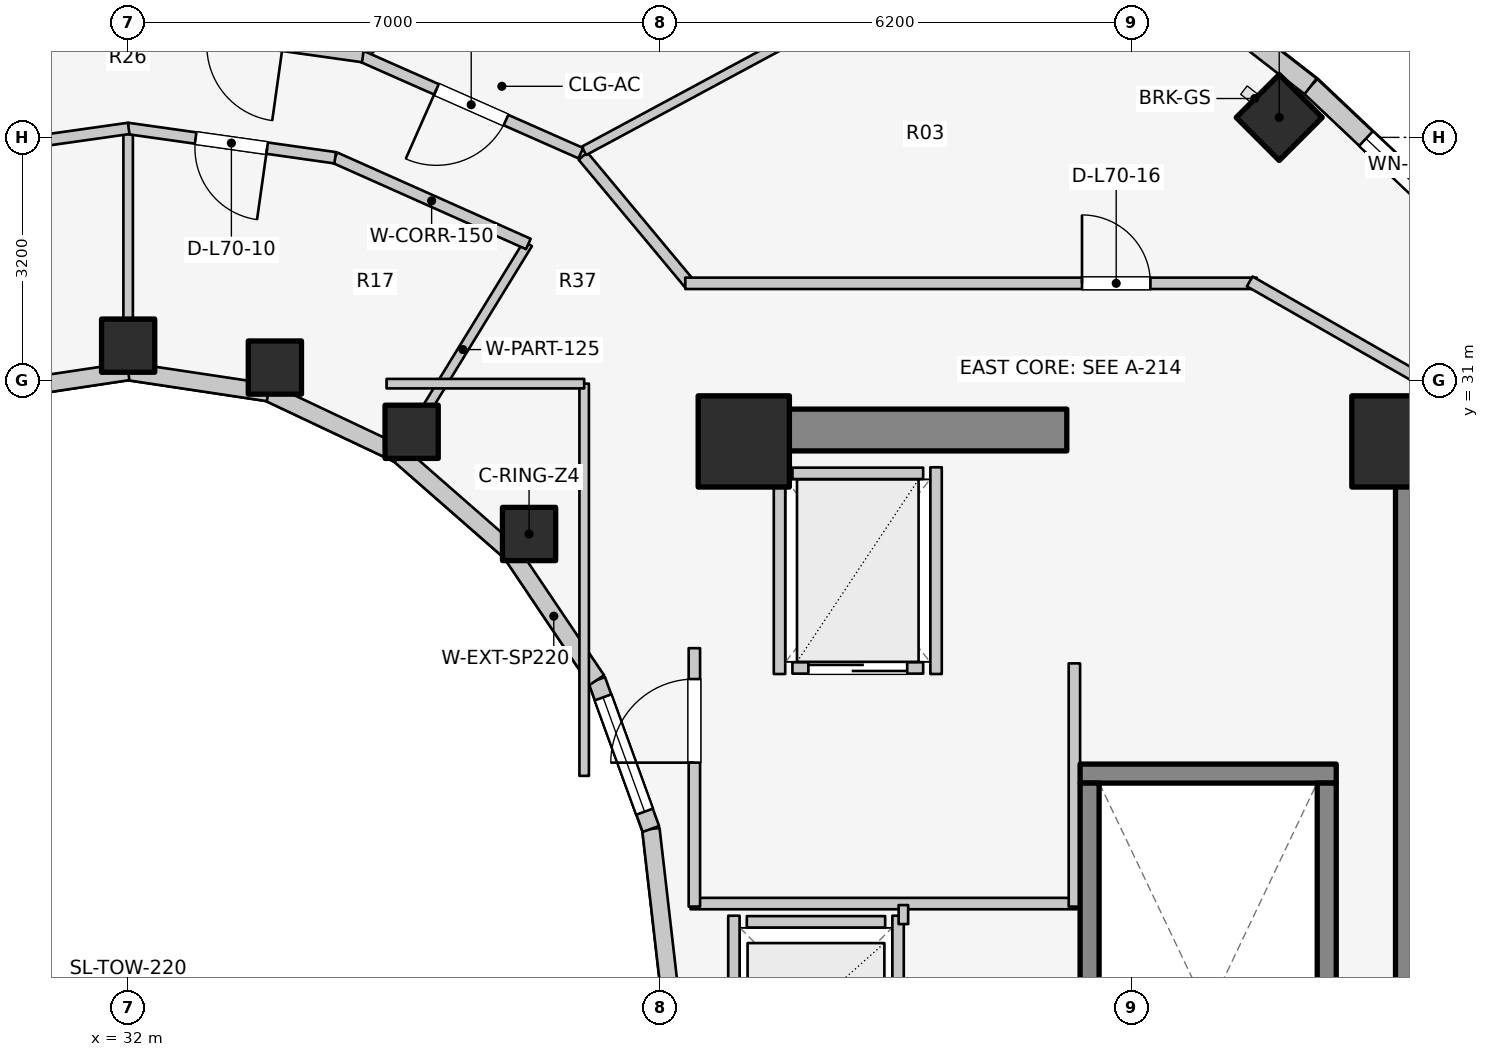
"""IFC4 building model, lengths in metres.
Left out: names, types, materials, properties, quantities, classifications, styles, units other than length and angle.
Written with IfcOpenShell. Run it as: python <this file> out.ifc"""

import sys

from ifc_helpers import new_model, si_unit, direction, frame, frame_2d, origin, origin_2d, place, context, subcontext, project, spatial, rectangle, extrude, element, fill, save


model = new_model("IFC4")
c1 = context("Model", 3, precision=1e-05, world=origin(), true_north=direction((0.0, 1.0)))
c2 = subcontext(c1, "Body", "Model", "MODEL_VIEW")
j1 = project(units=[si_unit("LENGTHUNIT", "METRE"), si_unit("PLANEANGLEUNIT", "RADIAN")], contexts=[c1])
p1 = place(None, origin())
s1 = spatial("IfcSite", under=j1, at=p1, CompositionType="ELEMENT")
p2 = place(p1, origin())
s2 = spatial("IfcBuilding", under=s1, at=p2, CompositionType="ELEMENT")
p3 = place(p2, frame((0.0, 0.0, 229.5)))
s3 = spatial("IfcBuildingStorey", under=s2, at=p3, CompositionType="ELEMENT", Elevation=229.5)
p4 = place(p3, frame((48.95, 17.05, 0.0), z_axis=(0.0, 0.0, 1.0), x_axis=(0.0, 1.0, 0.0)))
e1 = element("IfcWall", 1, at=p4, inside=s3, PredefinedType="SHEAR", context=c2, shape_type="SweptSolid", body=[
    extrude(rectangle(XDim=12.8, YDim=0.55, at=frame_2d((6.4, 0.0))), origin(), (0.0, 0.0, 1.0), 3.1),
])
p5 = place(p3, frame((39.85, 30.35, 0.0), z_axis=(0.0, 0.0, 1.0), x_axis=(1.0, 0.0, 0.0)))
e2 = element("IfcWall", 2, at=p5, inside=s3, PredefinedType="SHEAR", context=c2, shape_type="SweptSolid", body=[
    extrude(rectangle(XDim=4.5, YDim=0.55, at=frame_2d((2.25, 0.0))), origin(), (0.0, 0.0, 1.0), 3.1),
])
p6 = place(p3, frame((44.525, 25.83, 0.0), z_axis=(0.0, 0.0, 1.0), x_axis=(1.0, 0.0, 0.0)))
e3 = element("IfcWall", 3, at=p6, inside=s3, PredefinedType="SOLIDWALL", context=c2, shape_type="SweptSolid", body=[
    extrude(rectangle(XDim=3.37, YDim=0.25, at=frame_2d((1.685, 0.0))), origin(), (0.0, 0.0, 1.0), 3.1),
])
for number, where, z_axis, x_axis in (
    (4, (44.65, 17.895, 0.0), (0.0, 0.0, 1.0), (0.0, 1.0, 0.0)),
    (5, (47.77, 17.895, 0.0), (0.0, 0.0, 1.0), (0.0, 1.0, 0.0)),
):
    element("IfcWall", number, at=place(p3, frame(where, z_axis=z_axis, x_axis=x_axis)), inside=s3, PredefinedType="SOLIDWALL", context=c2, shape_type="SweptSolid", body=[
        extrude(rectangle(XDim=7.81, YDim=0.25, at=frame_2d((3.905, 0.0))), origin(), (0.0, 0.0, 1.0), 3.1),
    ])
for number, where, z_axis, x_axis in (
    (6, (48.7, 30.2, 0.0), (0.0, 0.0, 1.0), (1.0, 0.0, 0.0)),
    (7, (40.1, 30.2, 0.0), (0.0, 0.0, 1.0), (1.0, 0.0, 0.0)),
):
    element("IfcColumn", number, at=place(p3, frame(where, z_axis=z_axis, x_axis=x_axis)), inside=s3, PredefinedType="COLUMN", context=c2, shape_type="SweptSolid", body=[
        extrude(rectangle(XDim=1.2, YDim=1.2, at=origin_2d()), origin(), (0.0, 0.0, 1.0), 3.1),
    ])
p7 = place(p3, frame((37.275, 28.982, 0.0), z_axis=(0.0, 0.0, 1.0), x_axis=(1.0, 0.0, 0.0)))
e8 = element("IfcColumn", 8, at=p7, inside=s3, PredefinedType="COLUMN", context=c2, shape_type="SweptSolid", body=[
    extrude(rectangle(XDim=0.7, YDim=0.7, at=origin_2d()), origin(), (0.0, 0.0, 1.0), 3.1),
])
p8 = place(p3, frame((47.145, 34.462, 0.0), z_axis=(0.0, 0.0, 1.0), x_axis=(0.707106781187, 0.707106781187, 0.0)))
e9 = element("IfcColumn", 9, at=p8, inside=s3, PredefinedType="COLUMN", context=c2, shape_type="SweptSolid", body=[
    extrude(rectangle(XDim=0.8, YDim=0.8, at=origin_2d()), origin(), (0.0, 0.0, 1.0), 3.1),
])
for number, where, z_axis, x_axis in (
    (10, (35.73, 30.327, 0.0), (0.0, 0.0, 1.0), (1.0, 0.0, 0.0)),
    (11, (33.931, 31.172, 0.0), (0.0, 0.0, 1.0), (1.0, 0.0, 0.0)),
    (12, (32.0, 31.46, 0.0), (0.0, 0.0, 1.0), (1.0, 0.0, 0.0)),
):
    element("IfcColumn", number, at=place(p3, frame(where, z_axis=z_axis, x_axis=x_axis)), inside=s3, PredefinedType="COLUMN", context=c2, shape_type="SweptSolid", body=[
        extrude(rectangle(XDim=0.7, YDim=0.7, at=origin_2d()), origin(), (0.0, 0.0, 1.0), 3.1),
    ])
p9 = place(p3, frame((39.12, 23.0, 0.0), z_axis=(0.0, 0.0, 1.0), x_axis=(-0.114711713601, 0.993398823617, 0.0)))
e13 = element("IfcWall", 13, at=p9, inside=s3, PredefinedType="STANDARD", context=c2, shape_type="SweptSolid", body=[
    extrude(rectangle(XDim=2.115, YDim=0.23, at=frame_2d((1.058, 0.0))), origin(), (0.0, 0.0, 1.0), 2.84),
])
p10 = place(p3, frame((38.877, 25.102, 0.0), z_axis=(0.0, 0.0, 1.0), x_axis=(-0.341423187295, 0.93990968033, 0.0)))
e14 = element("IfcWall", 14, at=p10, inside=s3, PredefinedType="STANDARD", context=c2, shape_type="SweptSolid", body=[
    extrude(rectangle(XDim=2.084, YDim=0.23, at=frame_2d((1.042, 0.0))), origin(), (0.0, 0.0, 1.0), 2.84),
])
p11 = place(p10, frame((0.242, 0.0, 0.85)))
e15 = element("IfcOpeningElement", 15, at=p11, cuts=e14, PredefinedType="OPENING", context=c2, shape_type="SweptSolid", body=[
    extrude(rectangle(XDim=1.6, YDim=1.65, at=frame_2d((0.8, 0.825))), frame((0.0, 0.125, 0.0), z_axis=(0.0, -1.0, 0.0), x_axis=(1.0, 0.0, 0.0)), (0.0, 0.0, 1.0), 0.25),
])
p12 = place(p3, frame((38.166, 27.06, 0.0), z_axis=(0.0, 0.0, 1.0), x_axis=(-0.558197800898, 0.829707909492, 0.0)))
e16 = element("IfcWall", 16, at=p12, inside=s3, PredefinedType="STANDARD", context=c2, shape_type="SweptSolid", body=[
    extrude(rectangle(XDim=2.027, YDim=0.23, at=frame_2d((1.013, 0.0))), origin(), (0.0, 0.0, 1.0), 2.16),
])
p13 = place(p3, frame((37.035, 28.742, 0.0), z_axis=(0.0, 0.0, 1.0), x_axis=(-0.752576694707, 0.658504607869, 0.0)))
e17 = element("IfcWall", 17, at=p13, inside=s3, PredefinedType="STANDARD", context=c2, shape_type="SweptSolid", body=[
    extrude(rectangle(XDim=1.959, YDim=0.23, at=frame_2d((0.98, 0.0))), origin(), (0.0, 0.0, 1.0), 2.16),
])
p14 = place(p3, frame((35.56, 30.032, 0.0), z_axis=(0.0, 0.0, 1.0), x_axis=(-0.904179699603, 0.427152280606, 0.0)))
e18 = element("IfcWall", 18, at=p14, inside=s3, PredefinedType="STANDARD", context=c2, shape_type="SweptSolid", body=[
    extrude(rectangle(XDim=1.899, YDim=0.23, at=frame_2d((0.95, 0.0))), origin(), (0.0, 0.0, 1.0), 2.16),
])
for number, where, z_axis, x_axis in (
    (19, (33.843, 30.843, 0.0), (0.0, 0.0, 1.0), (-0.989, 0.149, 0.0)),
    (20, (32.0, 31.12, 0.0), (0.0, 0.0, 1.0), (-0.989, -0.149, 0.0)),
):
    element("IfcWall", number, at=place(p3, frame(where, z_axis=z_axis, x_axis=x_axis)), inside=s3, PredefinedType="STANDARD", context=c2, shape_type="SweptSolid", body=[
        extrude(rectangle(XDim=1.864, YDim=0.23, at=frame_2d((0.932, 0.0))), origin(), (0.0, 0.0, 1.0), 2.16),
    ])
p15 = place(p3, frame((50.761, 31.849, 0.0), z_axis=(0.0, 0.0, 1.0), x_axis=(-0.72731899451, 0.686299555752, 0.0)))
e21 = element("IfcWall", 21, at=p15, inside=s3, PredefinedType="STANDARD", context=c2, shape_type="SweptSolid", body=[
    extrude(rectangle(XDim=4.404, YDim=0.26, at=frame_2d((2.202, 0.0))), origin(), (0.0, 0.0, 1.0), 2.85),
])
p16 = place(p15, frame((1.002, 0.0, 0.75)))
e22 = element("IfcOpeningElement", 22, at=p16, cuts=e21, PredefinedType="OPENING", context=c2, shape_type="SweptSolid", body=[
    extrude(rectangle(XDim=2.4, YDim=1.7, at=frame_2d((1.2, 0.85))), frame((0.0, 0.14, 0.0), z_axis=(0.0, -1.0, 0.0), x_axis=(1.0, 0.0, 0.0)), (0.0, 0.0, 1.0), 0.28),
])
p17 = place(p3, frame((47.558, 34.872, 0.0), z_axis=(0.0, 0.0, 1.0), x_axis=(-0.790126214723, 0.612944177563, 0.0)))
e23 = element("IfcWall", 23, at=p17, inside=s3, PredefinedType="STANDARD", context=c2, shape_type="SweptSolid", body=[
    extrude(rectangle(XDim=4.667, YDim=0.26, at=frame_2d((2.333, 0.0))), origin(), (0.0, 0.0, 1.0), 2.85),
])
p18 = place(p3, frame((40.14, 23.88, 0.0), z_axis=(0.0, 0.0, 1.0), x_axis=(1.0, 0.0, 0.0)))
e24 = element("IfcWall", 24, at=p18, inside=s3, PredefinedType="SOLIDWALL", context=c2, shape_type="SweptSolid", body=[
    extrude(rectangle(XDim=1.82, YDim=0.15, at=frame_2d((0.91, 0.0))), origin(), (0.0, 0.0, 1.0), 2.12),
])
p19 = place(p3, frame((39.97, 21.64, 0.0), z_axis=(0.0, 0.0, 1.0), x_axis=(0.0, 1.0, 0.0)))
e25 = element("IfcWall", 25, at=p19, inside=s3, PredefinedType="SOLIDWALL", context=c2, shape_type="SweptSolid", body=[
    extrude(rectangle(XDim=2.32, YDim=0.15, at=frame_2d((1.16, 0.0))), origin(), (0.0, 0.0, 1.0), 2.12),
])
p20 = place(p3, frame((42.13, 21.64, 0.0), z_axis=(0.0, 0.0, 1.0), x_axis=(0.0, 1.0, 0.0)))
e26 = element("IfcWall", 26, at=p20, inside=s3, PredefinedType="SOLIDWALL", context=c2, shape_type="SweptSolid", body=[
    extrude(rectangle(XDim=2.32, YDim=0.15, at=frame_2d((1.16, 0.0))), origin(), (0.0, 0.0, 1.0), 2.855),
])
p21 = place(p3, frame((40.74, 27.22, 0.0), z_axis=(0.0, 0.0, 1.0), x_axis=(1.0, 0.0, 0.0)))
e27 = element("IfcWall", 27, at=p21, inside=s3, PredefinedType="SOLIDWALL", context=c2, shape_type="SweptSolid", body=[
    extrude(rectangle(XDim=1.72, YDim=0.15, at=frame_2d((0.86, 0.0))), origin(), (0.0, 0.0, 1.0), 2.855),
])
p22 = place(p21, frame((0.21, 0.0, 0.0)))
e28 = element("IfcOpeningElement", 28, at=p22, cuts=e27, PredefinedType="OPENING", context=c2, shape_type="SweptSolid", body=[
    extrude(rectangle(XDim=1.3, YDim=2.1, at=frame_2d((0.65, 1.05))), frame((0.0, 0.085, 0.0), z_axis=(0.0, -1.0, 0.0), x_axis=(1.0, 0.0, 0.0)), (0.0, 0.0, 1.0), 0.17),
])
p23 = place(p3, frame((40.74, 29.78, 0.0), z_axis=(0.0, 0.0, 1.0), x_axis=(1.0, 0.0, 0.0)))
e29 = element("IfcWall", 29, at=p23, inside=s3, PredefinedType="SOLIDWALL", context=c2, shape_type="SweptSolid", body=[
    extrude(rectangle(XDim=1.72, YDim=0.15, at=frame_2d((0.86, 0.0))), origin(), (0.0, 0.0, 1.0), 2.855),
])
for number, where, z_axis, x_axis in (
    (30, (40.57, 27.14, 0.0), (0.0, 0.0, 1.0), (0.0, 1.0, 0.0)),
    (31, (42.63, 27.14, 0.0), (0.0, 0.0, 1.0), (0.0, 1.0, 0.0)),
):
    element("IfcWall", number, at=place(p3, frame(where, z_axis=z_axis, x_axis=x_axis)), inside=s3, PredefinedType="SOLIDWALL", context=c2, shape_type="SweptSolid", body=[
        extrude(rectangle(XDim=2.72, YDim=0.15, at=frame_2d((1.36, 0.0))), origin(), (0.0, 0.0, 1.0), 2.855),
    ])
p24 = place(p3, frame((39.4, 24.12, 0.0), z_axis=(0.0, 0.0, 1.0), x_axis=(1.0, 0.0, 0.0)))
e32 = element("IfcWall", 32, at=p24, inside=s3, PredefinedType="PARTITIONING", context=c2, shape_type="SweptSolid", body=[
    extrude(rectangle(XDim=5.08, YDim=0.15, at=frame_2d((2.54, 0.0))), origin(), (0.0, 0.0, 1.0), 2.12),
])
p25 = place(p3, frame((44.45, 24.08, 0.0), z_axis=(0.0, 0.0, 1.0), x_axis=(0.0, 1.0, 0.0)))
e33 = element("IfcWall", 33, at=p25, inside=s3, PredefinedType="PARTITIONING", context=c2, shape_type="SweptSolid", body=[
    extrude(rectangle(XDim=3.2, YDim=0.15, at=frame_2d((1.6, 0.0))), origin(), (0.0, 0.0, 1.0), 2.855),
])
p26 = place(p3, frame((39.45, 24.08, 0.0), z_axis=(0.0, 0.0, 1.0), x_axis=(0.0, 1.0, 0.0)))
e34 = element("IfcWall", 34, at=p26, inside=s3, PredefinedType="PARTITIONING", context=c2, shape_type="SweptSolid", body=[
    extrude(rectangle(XDim=3.4, YDim=0.15, at=frame_2d((1.7, 0.0))), origin(), (0.0, 0.0, 1.0), 2.855),
])
p27 = place(p26, frame((1.894, 0.0, 0.0)))
e35 = element("IfcOpeningElement", 35, at=p27, cuts=e34, PredefinedType="OPENING", context=c2, shape_type="SweptSolid", body=[
    extrude(rectangle(XDim=1.1, YDim=2.1, at=frame_2d((0.55, 1.05))), frame((0.0, 0.085, 0.0), z_axis=(0.0, -1.0, 0.0), x_axis=(1.0, 0.0, 0.0)), (0.0, 0.0, 1.0), 0.17),
])
p28 = place(p3, frame((42.2, 23.85, 0.0), z_axis=(0.0, 0.0, 1.0), x_axis=(0.0, 1.0, 0.0)))
e36 = element("IfcWall", 36, at=p28, inside=s3, PredefinedType="PARTITIONING", context=c2, shape_type="SweptSolid", body=[
    extrude(rectangle(XDim=0.25, YDim=0.125, at=frame_2d((0.125, 0.0))), origin(), (0.0, 0.0, 1.0), 2.855),
])
p29 = place(p3, frame((35.55, 30.015, 0.0), z_axis=(0.0, 0.0, 1.0), x_axis=(0.522763432117, 0.852477796802, 0.0)))
e37 = element("IfcWall", 37, at=p29, inside=s3, PredefinedType="PARTITIONING", context=c2, shape_type="SweptSolid", body=[
    extrude(rectangle(XDim=3.269, YDim=0.125, at=frame_2d((1.635, 0.0))), origin(), (0.0, 0.0, 1.0), 2.376),
])
p30 = place(p3, frame((32.0, 31.1, 0.0), z_axis=(0.0, 0.0, 1.0), x_axis=(0.0, 1.0, 0.0)))
e38 = element("IfcWall", 38, at=p30, inside=s3, PredefinedType="PARTITIONING", context=c2, shape_type="SweptSolid", body=[
    extrude(rectangle(XDim=3.218, YDim=0.125, at=frame_2d((1.609, 0.0))), origin(), (0.0, 0.0, 1.0), 2.376),
])
p31 = place(p3, frame((37.265, 32.798, 0.0), z_axis=(0.0, 0.0, 1.0), x_axis=(-0.913254317828, 0.407389924971, 0.0)))
e39 = element("IfcWall", 39, at=p31, inside=s3, PredefinedType="PARTITIONING", context=c2, shape_type="SweptSolid", body=[
    extrude(rectangle(XDim=2.787, YDim=0.15, at=frame_2d((1.393, 0.0))), origin(), (0.0, 0.0, 1.0), 2.376),
])
p32 = place(p3, frame((34.724, 33.932, 0.0), z_axis=(0.0, 0.0, 1.0), x_axis=(-0.990150268487, 0.140008734782, 0.0)))
e40 = element("IfcWall", 40, at=p32, inside=s3, PredefinedType="PARTITIONING", context=c2, shape_type="SweptSolid", body=[
    extrude(rectangle(XDim=2.759, YDim=0.15, at=frame_2d((1.379, 0.0))), origin(), (0.0, 0.0, 1.0), 2.376),
])
p33 = place(p32, frame((0.904, 0.0, 0.0)))
e41 = element("IfcOpeningElement", 41, at=p33, cuts=e40, PredefinedType="OPENING", context=c2, shape_type="SweptSolid", body=[
    extrude(rectangle(XDim=0.95, YDim=2.1, at=frame_2d((0.475, 1.05))), frame((0.0, 0.085, 0.0), z_axis=(0.0, -1.0, 0.0), x_axis=(1.0, 0.0, 0.0)), (0.0, 0.0, 1.0), 0.17),
])
p34 = place(p3, frame((32.007, 34.318, 0.0), z_axis=(0.0, 0.0, 1.0), x_axis=(-0.990150268487, -0.140008734782, 0.0)))
e42 = element("IfcWall", 42, at=p34, inside=s3, PredefinedType="PARTITIONING", context=c2, shape_type="SweptSolid", body=[
    extrude(rectangle(XDim=2.759, YDim=0.15, at=frame_2d((1.379, 0.0))), origin(), (0.0, 0.0, 1.0), 2.376),
])
p35 = place(p3, frame((38.0, 25.8, 0.0), z_axis=(0.0, 0.0, 1.0), x_axis=(0.0, 1.0, 0.0)))
e43 = element("IfcWall", 43, at=p35, inside=s3, PredefinedType="PARTITIONING", context=c2, shape_type="SweptSolid", body=[
    extrude(rectangle(XDim=5.16, YDim=0.125, at=frame_2d((2.58, 0.0))), origin(), (0.0, 0.0, 1.0), 2.232),
])
p36 = place(p3, frame((35.4, 30.96, 0.0), z_axis=(0.0, 0.0, 1.0), x_axis=(1.0, 0.0, 0.0)))
e44 = element("IfcWall", 44, at=p36, inside=s3, PredefinedType="PARTITIONING", context=c2, shape_type="SweptSolid", body=[
    extrude(rectangle(XDim=2.6, YDim=0.125, at=frame_2d((1.3, 0.0))), origin(), (0.0, 0.0, 1.0), 2.376),
])
p37 = place(p3, frame((37.984, 33.955, 0.0), z_axis=(0.0, 0.0, 1.0), x_axis=(0.64030392053, -0.76812166312, 0.0)))
e45 = element("IfcWall", 45, at=p37, inside=s3, PredefinedType="PARTITIONING", context=c2, shape_type="SweptSolid", body=[
    extrude(rectangle(XDim=2.21, YDim=0.15, at=frame_2d((1.105, 0.0))), origin(), (0.0, 0.0, 1.0), 2.376),
])
p38 = place(p3, frame((39.33, 32.28, 0.0), z_axis=(0.0, 0.0, 1.0), x_axis=(1.0, 0.0, 0.0)))
e46 = element("IfcWall", 46, at=p38, inside=s3, PredefinedType="PARTITIONING", context=c2, shape_type="SweptSolid", body=[
    extrude(rectangle(XDim=7.52, YDim=0.15, at=frame_2d((3.76, 0.0))), origin(), (0.0, 0.0, 1.0), 2.376),
])
p39 = place(p38, frame((5.22, 0.0, 0.0)))
e47 = element("IfcOpeningElement", 47, at=p39, cuts=e46, PredefinedType="OPENING", context=c2, shape_type="SweptSolid", body=[
    extrude(rectangle(XDim=0.9, YDim=2.1, at=frame_2d((0.45, 1.05))), frame((0.0, 0.085, 0.0), z_axis=(0.0, -1.0, 0.0), x_axis=(1.0, 0.0, 0.0)), (0.0, 0.0, 1.0), 0.17),
])
p40 = place(p3, frame((46.757, 32.305, 0.0), z_axis=(0.0, 0.0, 1.0), x_axis=(0.867991349648, -0.496579315857, 0.0)))
e48 = element("IfcWall", 48, at=p40, inside=s3, PredefinedType="PARTITIONING", context=c2, shape_type="SweptSolid", body=[
    extrude(rectangle(XDim=2.567, YDim=0.15, at=frame_2d((1.283, 0.0))), origin(), (0.0, 0.0, 1.0), 2.22),
])
p41 = place(p3, frame((37.997, 34.023, 0.0), z_axis=(0.0, 0.0, 1.0), x_axis=(0.880531534665, 0.473987569943, 0.0)))
e49 = element("IfcWall", 49, at=p41, inside=s3, PredefinedType="PARTITIONING", context=c2, shape_type="SweptSolid", body=[
    extrude(rectangle(XDim=6.096, YDim=0.125, at=frame_2d((3.048, 0.0))), origin(), (0.0, 0.0, 1.0), 2.376),
])
p42 = place(p3, frame((35.118, 35.304, 0.0), z_axis=(0.0, 0.0, 1.0), x_axis=(0.702191571271, 0.711988059756, 0.0)))
e50 = element("IfcWall", 50, at=p42, inside=s3, PredefinedType="PARTITIONING", context=c2, shape_type="SweptSolid", body=[
    extrude(rectangle(XDim=5.184, YDim=0.125, at=frame_2d((2.592, 0.0))), origin(), (0.0, 0.0, 1.0), 2.376),
])
p43 = place(p3, frame((37.956, 33.992, 0.0), z_axis=(0.0, 0.0, 1.0), x_axis=(-0.914642679993, 0.404263240891, 0.0)))
e51 = element("IfcWall", 51, at=p43, inside=s3, PredefinedType="PARTITIONING", context=c2, shape_type="SweptSolid", body=[
    extrude(rectangle(XDim=3.154, YDim=0.15, at=frame_2d((1.577, 0.0))), origin(), (0.0, 0.0, 1.0), 2.376),
])
p44 = place(p43, frame((1.077, 0.0, 0.0)))
e52 = element("IfcOpeningElement", 52, at=p44, cuts=e51, PredefinedType="OPENING", context=c2, shape_type="SweptSolid", body=[
    extrude(rectangle(XDim=1.0, YDim=2.1, at=frame_2d((0.5, 1.05))), frame((0.0, 0.085, 0.0), z_axis=(0.0, -1.0, 0.0), x_axis=(1.0, 0.0, 0.0)), (0.0, 0.0, 1.0), 0.17),
])
p45 = place(p3, frame((35.087, 35.263, 0.0), z_axis=(0.0, 0.0, 1.0), x_axis=(-0.990268690673, 0.139168675614, 0.0)))
e53 = element("IfcWall", 53, at=p45, inside=s3, PredefinedType="PARTITIONING", context=c2, shape_type="SweptSolid", body=[
    extrude(rectangle(XDim=3.126, YDim=0.15, at=frame_2d((1.563, 0.0))), origin(), (0.0, 0.0, 1.0), 2.376),
])
p46 = place(p45, frame((1.063, 0.0, 0.0)))
e54 = element("IfcOpeningElement", 54, at=p46, cuts=e53, PredefinedType="OPENING", context=c2, shape_type="SweptSolid", body=[
    extrude(rectangle(XDim=1.0, YDim=2.1, at=frame_2d((0.5, 1.05))), frame((0.0, 0.085, 0.0), z_axis=(0.0, -1.0, 0.0), x_axis=(1.0, 0.0, 0.0)), (0.0, 0.0, 1.0), 0.17),
])
p47 = place(p3, frame((32.008, 35.698, 0.0), z_axis=(0.0, 0.0, 1.0), x_axis=(-0.990268690673, -0.139168675614, 0.0)))
e55 = element("IfcWall", 55, at=p47, inside=s3, PredefinedType="PARTITIONING", context=c2, shape_type="SweptSolid", body=[
    extrude(rectangle(XDim=3.126, YDim=0.15, at=frame_2d((1.563, 0.0))), origin(), (0.0, 0.0, 1.0), 2.376),
])
p48 = place(p47, frame((1.063, 0.0, 0.0)))
e56 = element("IfcOpeningElement", 56, at=p48, cuts=e55, PredefinedType="OPENING", context=c2, shape_type="SweptSolid", body=[
    extrude(rectangle(XDim=1.0, YDim=2.1, at=frame_2d((0.5, 1.05))), frame((0.0, 0.085, 0.0), z_axis=(0.0, -1.0, 0.0), x_axis=(1.0, 0.0, 0.0)), (0.0, 0.0, 1.0), 0.17),
])
p49 = place(p11, origin())
e57 = element("IfcWindow", 57, at=p49, inside=s3, PartitioningType="SINGLE_PANEL", PredefinedType="WINDOW", context=c2, shape_type="SweptSolid", body=[
    extrude(rectangle(XDim=1.6, YDim=1.65, at=frame_2d((0.8, 0.825))), frame((0.0, 0.03, 0.0), z_axis=(0.0, -1.0, 0.0), x_axis=(1.0, 0.0, 0.0)), (0.0, 0.0, 1.0), 0.06),
])
fill(e15, e57)
p50 = place(p16, origin())
e58 = element("IfcWindow", 58, at=p50, inside=s3, PartitioningType="SINGLE_PANEL", PredefinedType="WINDOW", context=c2, shape_type="SweptSolid", body=[
    extrude(rectangle(XDim=2.4, YDim=1.7, at=frame_2d((1.2, 0.85))), frame((0.0, 0.03, 0.0), z_axis=(0.0, -1.0, 0.0), x_axis=(1.0, 0.0, 0.0)), (0.0, 0.0, 1.0), 0.06),
])
fill(e22, e58)
p51 = place(p22, origin())
e59 = element("IfcDoor", 59, at=p51, inside=s3, OperationType="DOUBLE_DOOR_SLIDING", PredefinedType="DOOR", context=c2, shape_type="SweptSolid", body=[
    extrude(rectangle(XDim=1.3, YDim=2.1, at=frame_2d((0.65, 1.05))), frame((0.0, 0.025, 0.0), z_axis=(0.0, -1.0, 0.0), x_axis=(1.0, 0.0, 0.0)), (0.0, 0.0, 1.0), 0.05),
])
fill(e28, e59)
p52 = place(p27, origin())
e60 = element("IfcDoor", 60, at=p52, inside=s3, OperationType="SINGLE_SWING_LEFT", PredefinedType="DOOR", context=c2, shape_type="SweptSolid", body=[
    extrude(rectangle(XDim=1.1, YDim=2.1, at=frame_2d((0.55, 1.05))), frame((0.0, 0.025, 0.0), z_axis=(0.0, -1.0, 0.0), x_axis=(1.0, 0.0, 0.0)), (0.0, 0.0, 1.0), 0.05),
])
fill(e35, e60)
p53 = place(p33, origin())
e61 = element("IfcDoor", 61, at=p53, inside=s3, OperationType="SINGLE_SWING_LEFT", PredefinedType="DOOR", context=c2, shape_type="SweptSolid", body=[
    extrude(rectangle(XDim=0.95, YDim=2.1, at=frame_2d((0.475, 1.05))), frame((0.0, 0.025, 0.0), z_axis=(0.0, -1.0, 0.0), x_axis=(1.0, 0.0, 0.0)), (0.0, 0.0, 1.0), 0.05),
])
fill(e41, e61)
p54 = place(p39, origin())
e62 = element("IfcDoor", 62, at=p54, inside=s3, OperationType="SINGLE_SWING_LEFT", PredefinedType="DOOR", context=c2, shape_type="SweptSolid", body=[
    extrude(rectangle(XDim=0.9, YDim=2.1, at=frame_2d((0.45, 1.05))), frame((0.0, 0.025, 0.0), z_axis=(0.0, -1.0, 0.0), x_axis=(1.0, 0.0, 0.0)), (0.0, 0.0, 1.0), 0.05),
])
fill(e47, e62)
p55 = place(p44, origin())
e63 = element("IfcDoor", 63, at=p55, inside=s3, OperationType="SINGLE_SWING_RIGHT", PredefinedType="DOOR", context=c2, shape_type="SweptSolid", body=[
    extrude(rectangle(XDim=1.0, YDim=2.1, at=frame_2d((0.5, 1.05))), frame((0.0, 0.025, 0.0), z_axis=(0.0, -1.0, 0.0), x_axis=(1.0, 0.0, 0.0)), (0.0, 0.0, 1.0), 0.05),
])
fill(e52, e63)
save(model, sys.argv[1])
